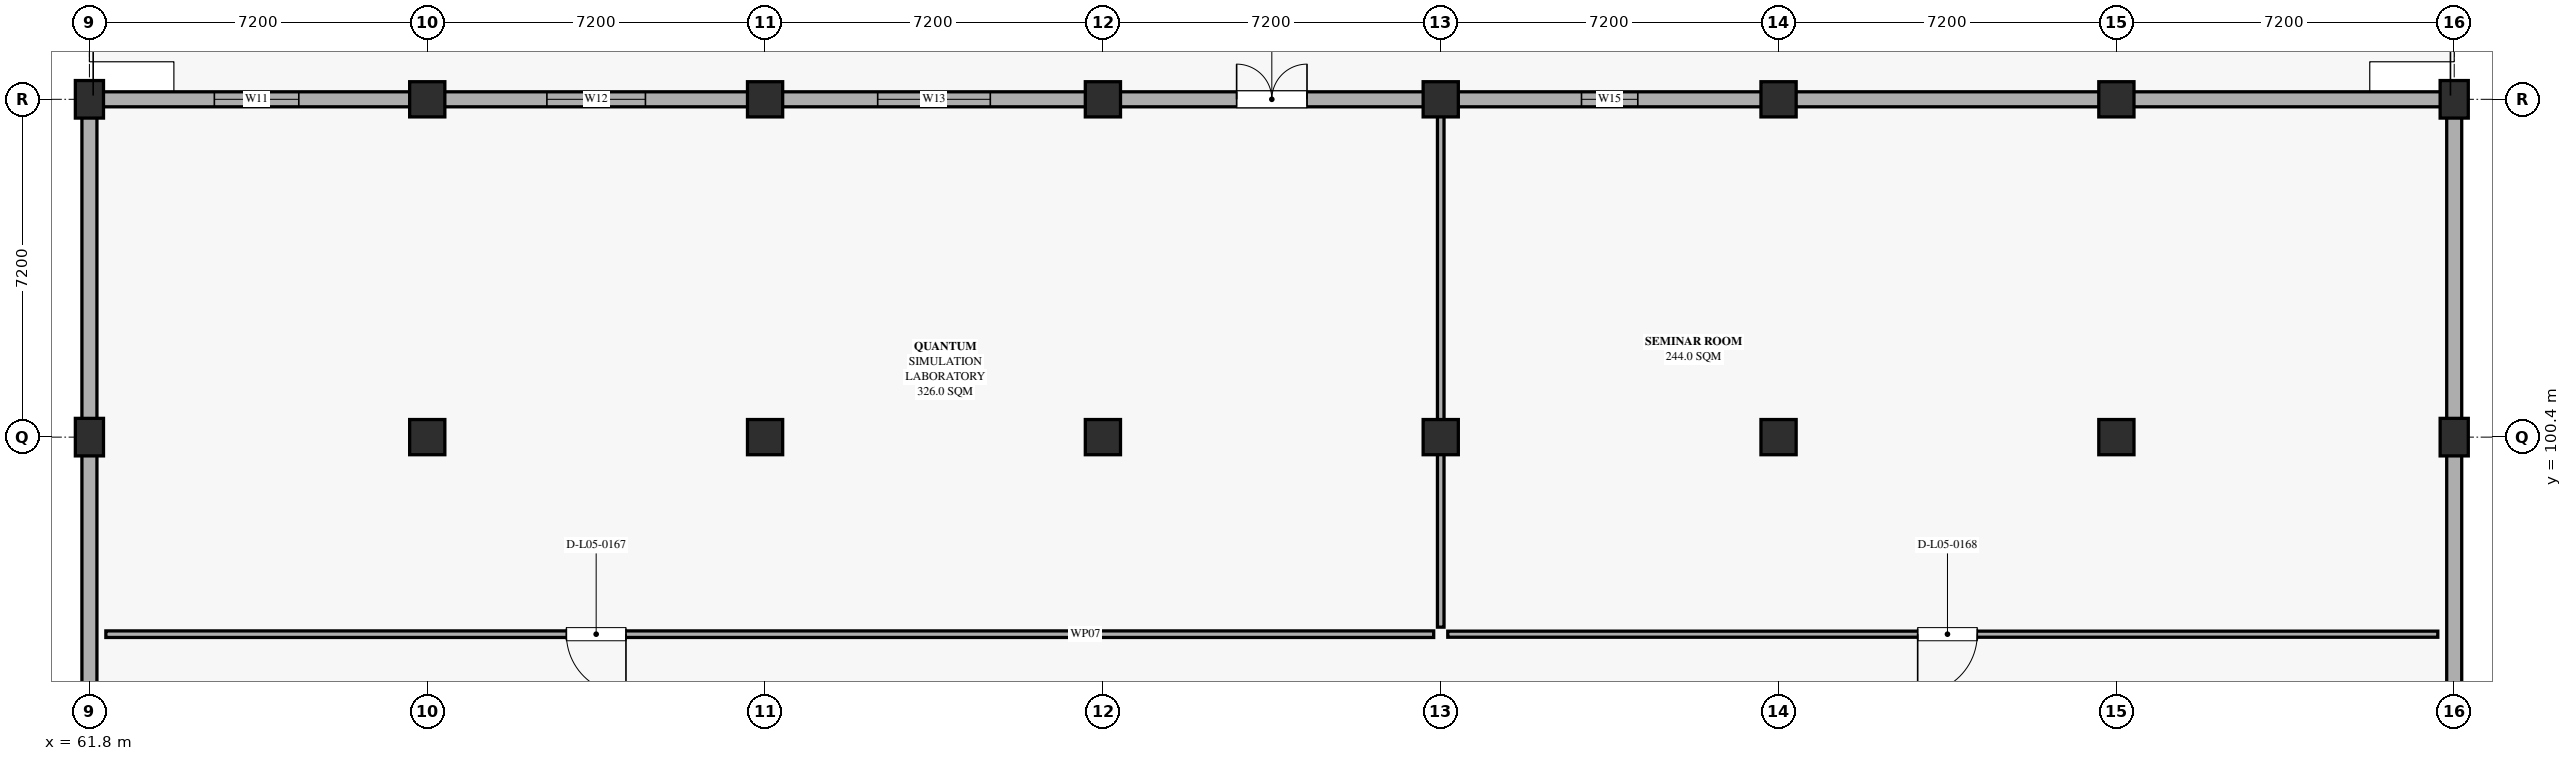
"""IFC4 building model, lengths in metres.
Left out: names, types, materials, properties, quantities, classifications, styles, units other than length and angle.
Written with IfcOpenShell. Run it as: python <this file> out.ifc"""

import sys

from ifc_helpers import new_model, si_unit, direction, frame, frame_2d, origin, origin_2d, place, context, subcontext, project, spatial, rectangle, extrude, element, fill, save


model = new_model("IFC4")
c1 = context("Model", 3, precision=1e-05, world=origin(), true_north=direction((0.0, 1.0)))
c2 = subcontext(c1, "Body", "Model", "MODEL_VIEW")
j1 = project(units=[si_unit("LENGTHUNIT", "METRE"), si_unit("PLANEANGLEUNIT", "RADIAN")], contexts=[c1])
p1 = place(None, origin())
s1 = spatial("IfcSite", under=j1, at=p1, CompositionType="ELEMENT")
p2 = place(p1, origin())
s2 = spatial("IfcBuilding", under=s1, at=p2, CompositionType="ELEMENT")
p3 = place(p2, frame((0.0, 0.0, 24.3)))
s3 = spatial("IfcBuildingStorey", under=s2, at=p3, CompositionType="ELEMENT", Elevation=24.3)
p4 = place(p3, frame((61.8, 100.4, 0.0), z_axis=(0.0, 0.0, 1.0), x_axis=(1.0, 0.0, 0.0)))
e1 = element("IfcColumn", 1, at=p4, inside=s3, PredefinedType="COLUMN", context=c2, shape_type="SweptSolid", body=[
    extrude(rectangle(XDim=0.6, YDim=0.8, at=origin_2d()), origin(), (0.0, 0.0, 1.0), 4.5),
])
for number, where, z_axis, x_axis in (
    (2, (69.0, 100.4, 0.0), (0.0, 0.0, 1.0), (1.0, 0.0, 0.0)),
    (3, (76.2, 100.4, 0.0), (0.0, 0.0, 1.0), (1.0, 0.0, 0.0)),
    (4, (83.4, 100.4, 0.0), (0.0, 0.0, 1.0), (1.0, 0.0, 0.0)),
    (5, (90.6, 100.4, 0.0), (0.0, 0.0, 1.0), (1.0, 0.0, 0.0)),
    (6, (97.8, 100.4, 0.0), (0.0, 0.0, 1.0), (1.0, 0.0, 0.0)),
    (7, (105.0, 100.4, 0.0), (0.0, 0.0, 1.0), (1.0, 0.0, 0.0)),
):
    element("IfcColumn", number, at=place(p3, frame(where, z_axis=z_axis, x_axis=x_axis)), inside=s3, PredefinedType="COLUMN", context=c2, shape_type="SweptSolid", body=[
        extrude(rectangle(XDim=0.75, YDim=0.75, at=origin_2d()), origin(), (0.0, 0.0, 1.0), 4.5),
    ])
for number, where, z_axis, x_axis in (
    (8, (112.2, 100.4, 0.0), (0.0, 0.0, 1.0), (1.0, 0.0, 0.0)),
    (9, (61.8, 107.6, 0.0), (0.0, 0.0, 1.0), (1.0, 0.0, 0.0)),
):
    element("IfcColumn", number, at=place(p3, frame(where, z_axis=z_axis, x_axis=x_axis)), inside=s3, PredefinedType="COLUMN", context=c2, shape_type="SweptSolid", body=[
        extrude(rectangle(XDim=0.6, YDim=0.8, at=origin_2d()), origin(), (0.0, 0.0, 1.0), 4.5),
    ])
for number, where, z_axis, x_axis in (
    (10, (69.0, 107.6, 0.0), (0.0, 0.0, 1.0), (1.0, 0.0, 0.0)),
    (11, (76.2, 107.6, 0.0), (0.0, 0.0, 1.0), (1.0, 0.0, 0.0)),
    (12, (83.4, 107.6, 0.0), (0.0, 0.0, 1.0), (1.0, 0.0, 0.0)),
    (13, (90.6, 107.6, 0.0), (0.0, 0.0, 1.0), (1.0, 0.0, 0.0)),
    (14, (97.8, 107.6, 0.0), (0.0, 0.0, 1.0), (1.0, 0.0, 0.0)),
    (15, (105.0, 107.6, 0.0), (0.0, 0.0, 1.0), (1.0, 0.0, 0.0)),
):
    element("IfcColumn", number, at=place(p3, frame(where, z_axis=z_axis, x_axis=x_axis)), inside=s3, PredefinedType="COLUMN", context=c2, shape_type="SweptSolid", body=[
        extrude(rectangle(XDim=0.75, YDim=0.75, at=origin_2d()), origin(), (0.0, 0.0, 1.0), 4.5),
    ])
p5 = place(p3, frame((112.2, 107.6, 0.0), z_axis=(0.0, 0.0, 1.0), x_axis=(1.0, 0.0, 0.0)))
e16 = element("IfcColumn", 16, at=p5, inside=s3, PredefinedType="COLUMN", context=c2, shape_type="SweptSolid", body=[
    extrude(rectangle(XDim=0.6, YDim=0.8, at=origin_2d()), origin(), (0.0, 0.0, 1.0), 4.5),
])
for number, where, z_axis, x_axis in (
    (17, (61.8, 93.585, 0.0), (0.0, 0.0, 1.0), (0.0, 1.0, 0.0)),
    (18, (112.2, 100.015, 0.0), (0.0, 0.0, 1.0), (0.0, -1.0, 0.0)),
):
    element("IfcWall", number, at=place(p3, frame(where, z_axis=z_axis, x_axis=x_axis)), inside=s3, PredefinedType="SOLIDWALL", context=c2, shape_type="SweptSolid", body=[
        extrude(rectangle(XDim=6.43, YDim=0.32, at=frame_2d((3.215, 0.0))), origin(), (0.0, 0.0, 1.0), 3.0),
    ])
for number, where, z_axis, x_axis in (
    (19, (61.8, 100.785, 0.0), (0.0, 0.0, 1.0), (0.0, 1.0, 0.0)),
    (20, (112.2, 107.215, 0.0), (0.0, 0.0, 1.0), (0.0, -1.0, 0.0)),
):
    element("IfcWall", number, at=place(p3, frame(where, z_axis=z_axis, x_axis=x_axis)), inside=s3, PredefinedType="SOLIDWALL", context=c2, shape_type="SweptSolid", body=[
        extrude(rectangle(XDim=6.43, YDim=0.32, at=frame_2d((3.215, 0.0))), origin(), (0.0, 0.0, 1.0), 3.0),
    ])
p6 = place(p3, frame((62.085, 107.6, 0.0), z_axis=(0.0, 0.0, 1.0), x_axis=(1.0, 0.0, 0.0)))
e21 = element("IfcWall", 21, at=p6, inside=s3, PredefinedType="SOLIDWALL", context=c2, shape_type="SweptSolid", body=[
    extrude(rectangle(XDim=6.555, YDim=0.32, at=frame_2d((3.277, 0.0))), origin(), (0.0, 0.0, 1.0), 3.0),
])
p7 = place(p6, frame((2.377, 0.0, 0.85)))
e22 = element("IfcOpeningElement", 22, at=p7, cuts=e21, PredefinedType="OPENING", context=c2, shape_type="SweptSolid", body=[
    extrude(rectangle(XDim=1.8, YDim=1.8, at=frame_2d((0.9, 0.9))), frame((0.0, 0.17, 0.0), z_axis=(0.0, -1.0, 0.0), x_axis=(1.0, 0.0, 0.0)), (0.0, 0.0, 1.0), 0.34),
])
p8 = place(p3, frame((69.36, 107.6, 0.0), z_axis=(0.0, 0.0, 1.0), x_axis=(1.0, 0.0, 0.0)))
e23 = element("IfcWall", 23, at=p8, inside=s3, PredefinedType="SOLIDWALL", context=c2, shape_type="SweptSolid", body=[
    extrude(rectangle(XDim=6.48, YDim=0.32, at=frame_2d((3.24, 0.0))), origin(), (0.0, 0.0, 1.0), 3.0),
])
p9 = place(p8, frame((2.19, 0.0, 0.85)))
e24 = element("IfcOpeningElement", 24, at=p9, cuts=e23, PredefinedType="OPENING", context=c2, shape_type="SweptSolid", body=[
    extrude(rectangle(XDim=2.1, YDim=1.8, at=frame_2d((1.05, 0.9))), frame((0.0, 0.17, 0.0), z_axis=(0.0, -1.0, 0.0), x_axis=(1.0, 0.0, 0.0)), (0.0, 0.0, 1.0), 0.34),
])
p10 = place(p3, frame((76.56, 107.6, 0.0), z_axis=(0.0, 0.0, 1.0), x_axis=(1.0, 0.0, 0.0)))
e25 = element("IfcWall", 25, at=p10, inside=s3, PredefinedType="SOLIDWALL", context=c2, shape_type="SweptSolid", body=[
    extrude(rectangle(XDim=6.48, YDim=0.32, at=frame_2d((3.24, 0.0))), origin(), (0.0, 0.0, 1.0), 3.0),
])
p11 = place(p10, frame((2.04, 0.0, 0.85)))
e26 = element("IfcOpeningElement", 26, at=p11, cuts=e25, PredefinedType="OPENING", context=c2, shape_type="SweptSolid", body=[
    extrude(rectangle(XDim=2.4, YDim=1.8, at=frame_2d((1.2, 0.9))), frame((0.0, 0.17, 0.0), z_axis=(0.0, -1.0, 0.0), x_axis=(1.0, 0.0, 0.0)), (0.0, 0.0, 1.0), 0.34),
])
p12 = place(p3, frame((83.76, 107.6, 0.0), z_axis=(0.0, 0.0, 1.0), x_axis=(1.0, 0.0, 0.0)))
e27 = element("IfcWall", 27, at=p12, inside=s3, PredefinedType="SOLIDWALL", context=c2, shape_type="SweptSolid", body=[
    extrude(rectangle(XDim=6.48, YDim=0.32, at=frame_2d((3.24, 0.0))), origin(), (0.0, 0.0, 1.0), 3.0),
])
p13 = place(p12, frame((2.49, 0.0, 0.0)))
e28 = element("IfcOpeningElement", 28, at=p13, cuts=e27, PredefinedType="OPENING", context=c2, shape_type="SweptSolid", body=[
    extrude(rectangle(XDim=1.5, YDim=2.2, at=frame_2d((0.75, 1.1))), frame((0.0, 0.17, 0.0), z_axis=(0.0, -1.0, 0.0), x_axis=(1.0, 0.0, 0.0)), (0.0, 0.0, 1.0), 0.34),
])
p14 = place(p3, frame((90.96, 107.6, 0.0), z_axis=(0.0, 0.0, 1.0), x_axis=(1.0, 0.0, 0.0)))
e29 = element("IfcWall", 29, at=p14, inside=s3, PredefinedType="SOLIDWALL", context=c2, shape_type="SweptSolid", body=[
    extrude(rectangle(XDim=6.48, YDim=0.32, at=frame_2d((3.24, 0.0))), origin(), (0.0, 0.0, 1.0), 3.0),
])
p15 = place(p14, frame((2.64, 0.0, 0.85)))
e30 = element("IfcOpeningElement", 30, at=p15, cuts=e29, PredefinedType="OPENING", context=c2, shape_type="SweptSolid", body=[
    extrude(rectangle(XDim=1.2, YDim=1.8, at=frame_2d((0.6, 0.9))), frame((0.0, 0.17, 0.0), z_axis=(0.0, -1.0, 0.0), x_axis=(1.0, 0.0, 0.0)), (0.0, 0.0, 1.0), 0.34),
])
p16 = place(p3, frame((98.16, 107.6, 0.0), z_axis=(0.0, 0.0, 1.0), x_axis=(1.0, 0.0, 0.0)))
e31 = element("IfcWall", 31, at=p16, inside=s3, PredefinedType="SOLIDWALL", context=c2, shape_type="SweptSolid", body=[
    extrude(rectangle(XDim=6.48, YDim=0.32, at=frame_2d((3.24, 0.0))), origin(), (0.0, 0.0, 1.0), 3.0),
])
p17 = place(p3, frame((105.36, 107.6, 0.0), z_axis=(0.0, 0.0, 1.0), x_axis=(1.0, 0.0, 0.0)))
e32 = element("IfcWall", 32, at=p17, inside=s3, PredefinedType="SOLIDWALL", context=c2, shape_type="SweptSolid", body=[
    extrude(rectangle(XDim=6.555, YDim=0.32, at=frame_2d((3.277, 0.0))), origin(), (0.0, 0.0, 1.0), 3.0),
])
p18 = place(p3, frame((90.45, 96.2, 0.0), z_axis=(0.0, 0.0, 1.0), x_axis=(-1.0, 0.0, 0.0)))
e33 = element("IfcWall", 33, at=p18, inside=s3, PredefinedType="PARTITIONING", context=c2, shape_type="SweptSolid", body=[
    extrude(rectangle(XDim=28.3, YDim=0.14, at=frame_2d((14.15, 0.0))), origin(), (0.0, 0.0, 1.0), 2.98),
])
p19 = place(p18, frame((17.215, 0.0, 0.0)))
e34 = element("IfcOpeningElement", 34, at=p19, cuts=e33, PredefinedType="OPENING", context=c2, shape_type="SweptSolid", body=[
    extrude(rectangle(XDim=1.27, YDim=2.05, at=frame_2d((0.635, 1.025))), frame((0.0, 0.08, 0.0), z_axis=(0.0, -1.0, 0.0), x_axis=(1.0, 0.0, 0.0)), (0.0, 0.0, 1.0), 0.16),
])
p20 = place(p3, frame((90.6, 107.45, 0.0), z_axis=(0.0, 0.0, 1.0), x_axis=(0.0, -1.0, 0.0)))
e35 = element("IfcWall", 35, at=p20, inside=s3, PredefinedType="PARTITIONING", context=c2, shape_type="SweptSolid", body=[
    extrude(rectangle(XDim=11.1, YDim=0.14, at=frame_2d((5.55, 0.0))), origin(), (0.0, 0.0, 1.0), 2.98),
])
p21 = place(p3, frame((111.85, 96.2, 0.0), z_axis=(0.0, 0.0, 1.0), x_axis=(-1.0, 0.0, 0.0)))
e36 = element("IfcWall", 36, at=p21, inside=s3, PredefinedType="PARTITIONING", context=c2, shape_type="SweptSolid", body=[
    extrude(rectangle(XDim=21.1, YDim=0.13, at=frame_2d((10.55, 0.0))), origin(), (0.0, 0.0, 1.0), 2.98),
])
p22 = place(p21, frame((9.815, 0.0, 0.0)))
e37 = element("IfcOpeningElement", 37, at=p22, cuts=e36, PredefinedType="OPENING", context=c2, shape_type="SweptSolid", body=[
    extrude(rectangle(XDim=1.27, YDim=2.1, at=frame_2d((0.635, 1.05))), frame((0.0, 0.075, 0.0), z_axis=(0.0, -1.0, 0.0), x_axis=(1.0, 0.0, 0.0)), (0.0, 0.0, 1.0), 0.15),
])
p23 = place(p7, origin())
e38 = element("IfcWindow", 38, at=p23, inside=s3, PartitioningType="DOUBLE_PANEL_VERTICAL", PredefinedType="WINDOW", context=c2, shape_type="SweptSolid", body=[
    extrude(rectangle(XDim=1.8, YDim=1.8, at=frame_2d((0.9, 0.9))), frame((0.0, 0.03, 0.0), z_axis=(0.0, -1.0, 0.0), x_axis=(1.0, 0.0, 0.0)), (0.0, 0.0, 1.0), 0.06),
])
fill(e22, e38)
p24 = place(p9, origin())
e39 = element("IfcWindow", 39, at=p24, inside=s3, PartitioningType="DOUBLE_PANEL_VERTICAL", PredefinedType="WINDOW", context=c2, shape_type="SweptSolid", body=[
    extrude(rectangle(XDim=2.1, YDim=1.8, at=frame_2d((1.05, 0.9))), frame((0.0, 0.03, 0.0), z_axis=(0.0, -1.0, 0.0), x_axis=(1.0, 0.0, 0.0)), (0.0, 0.0, 1.0), 0.06),
])
fill(e24, e39)
p25 = place(p11, origin())
e40 = element("IfcWindow", 40, at=p25, inside=s3, PartitioningType="DOUBLE_PANEL_VERTICAL", PredefinedType="WINDOW", context=c2, shape_type="SweptSolid", body=[
    extrude(rectangle(XDim=2.4, YDim=1.8, at=frame_2d((1.2, 0.9))), frame((0.0, 0.03, 0.0), z_axis=(0.0, -1.0, 0.0), x_axis=(1.0, 0.0, 0.0)), (0.0, 0.0, 1.0), 0.06),
])
fill(e26, e40)
p26 = place(p13, origin())
e41 = element("IfcDoor", 41, at=p26, inside=s3, OperationType="DOUBLE_DOOR_SINGLE_SWING", PredefinedType="DOOR", context=c2, shape_type="SweptSolid", body=[
    extrude(rectangle(XDim=1.5, YDim=2.2, at=frame_2d((0.75, 1.1))), frame((0.0, 0.025, 0.0), z_axis=(0.0, -1.0, 0.0), x_axis=(1.0, 0.0, 0.0)), (0.0, 0.0, 1.0), 0.05),
])
fill(e28, e41)
p27 = place(p15, origin())
e42 = element("IfcWindow", 42, at=p27, inside=s3, PartitioningType="SINGLE_PANEL", PredefinedType="WINDOW", context=c2, shape_type="SweptSolid", body=[
    extrude(rectangle(XDim=1.2, YDim=1.8, at=frame_2d((0.6, 0.9))), frame((0.0, 0.03, 0.0), z_axis=(0.0, -1.0, 0.0), x_axis=(1.0, 0.0, 0.0)), (0.0, 0.0, 1.0), 0.06),
])
fill(e30, e42)
p28 = place(p19, origin())
e43 = element("IfcDoor", 43, at=p28, inside=s3, OperationType="SINGLE_SWING_LEFT", PredefinedType="DOOR", context=c2, shape_type="SweptSolid", body=[
    extrude(rectangle(XDim=1.27, YDim=2.05, at=frame_2d((0.635, 1.025))), frame((0.0, 0.025, 0.0), z_axis=(0.0, -1.0, 0.0), x_axis=(1.0, 0.0, 0.0)), (0.0, 0.0, 1.0), 0.05),
])
fill(e34, e43)
p29 = place(p22, origin())
e44 = element("IfcDoor", 44, at=p29, inside=s3, OperationType="SINGLE_SWING_RIGHT", PredefinedType="DOOR", context=c2, shape_type="SweptSolid", body=[
    extrude(rectangle(XDim=1.27, YDim=2.1, at=frame_2d((0.635, 1.05))), frame((0.0, 0.025, 0.0), z_axis=(0.0, -1.0, 0.0), x_axis=(1.0, 0.0, 0.0)), (0.0, 0.0, 1.0), 0.05),
])
fill(e37, e44)
save(model, sys.argv[1])
